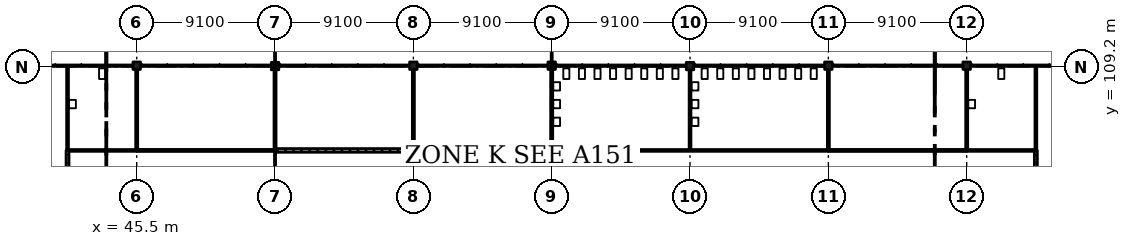
"""IFC4 building model, lengths in metres.
Left out: names, types, materials, properties, quantities, classifications, styles, units other than length and angle.
Written with IfcOpenShell. Run it as: python <this file> out.ifc"""

import sys

from ifc_helpers import new_model, si_unit, direction, frame, frame_2d, origin, origin_2d, place, context, subcontext, project, spatial, rectangle, extrude, element, fill, save


model = new_model("IFC4")
c1 = context("Model", 3, precision=1e-05, world=origin(), true_north=direction((0.0, 1.0)))
c2 = subcontext(c1, "Body", "Model", "MODEL_VIEW")
j1 = project(units=[si_unit("LENGTHUNIT", "METRE"), si_unit("PLANEANGLEUNIT", "RADIAN")], contexts=[c1])
p1 = place(None, origin())
s1 = spatial("IfcSite", under=j1, at=p1, CompositionType="ELEMENT")
p2 = place(p1, origin())
s2 = spatial("IfcBuilding", under=s1, at=p2, CompositionType="ELEMENT")
p3 = place(p2, frame((0.0, 0.0, 15.47)))
s3 = spatial("IfcBuildingStorey", under=s2, at=p3, CompositionType="ELEMENT", Elevation=15.47)
for number, where, z_axis, x_axis in (
    (1, (45.5, 109.275, 0.0), (0.0, 0.0, 1.0), (1.0, 0.0, 0.0)),
    (2, (54.6, 109.25, 0.0), (0.0, 0.0, 1.0), (1.0, 0.0, 0.0)),
    (3, (63.7, 109.275, 0.0), (0.0, 0.0, 1.0), (1.0, 0.0, 0.0)),
    (4, (72.8, 109.275, 0.0), (0.0, 0.0, 1.0), (1.0, 0.0, 0.0)),
    (5, (81.9, 109.25, 0.0), (0.0, 0.0, 1.0), (1.0, 0.0, 0.0)),
    (6, (91.0, 109.275, 0.0), (0.0, 0.0, 1.0), (1.0, 0.0, 0.0)),
    (7, (100.1, 109.275, 0.0), (0.0, 0.0, 1.0), (1.0, 0.0, 0.0)),
):
    element("IfcColumn", number, at=place(p3, frame(where, z_axis=z_axis, x_axis=x_axis)), inside=s3, PredefinedType="COLUMN", context=c2, shape_type="SweptSolid", body=[
        extrude(rectangle(XDim=0.5, YDim=0.5, at=origin_2d()), origin(), (0.0, 0.0, 1.0), 4.55),
    ])
p4 = place(p3, frame((40.95, 103.7, 0.0), z_axis=(0.0, 0.0, 1.0), x_axis=(0.0, -1.0, 0.0)))
e8 = element("IfcWall", 8, at=p4, inside=s3, PredefinedType="PARTITIONING", context=c2, shape_type="SweptSolid", body=[
    extrude(rectangle(XDim=3.6, YDim=0.2, at=frame_2d((1.8, 0.0))), origin(), (0.0, 0.0, 1.0), 3.7),
])
p5 = place(p4, frame((0.65, 0.0, 0.0)))
e9 = element("IfcOpeningElement", 9, at=p5, cuts=e8, PredefinedType="OPENING", context=c2, shape_type="SweptSolid", body=[
    extrude(rectangle(XDim=2.4, YDim=2.4, at=frame_2d((1.2, 1.2))), frame((0.0, 0.11, 0.0), z_axis=(0.0, -1.0, 0.0), x_axis=(1.0, 0.0, 0.0)), (0.0, 0.0, 1.0), 0.22),
])
p6 = place(p3, frame((40.95, 103.7, 0.0), z_axis=(0.0, 0.0, 1.0), x_axis=(0.0, 1.0, 0.0)))
e10 = element("IfcWall", 10, at=p6, inside=s3, PredefinedType="PARTITIONING", context=c2, shape_type="SweptSolid", body=[
    extrude(rectangle(XDim=5.47, YDim=0.125, at=frame_2d((2.735, 0.0))), origin(), (0.0, 0.0, 1.0), 3.7),
])
p7 = place(p3, frame((41.05, 103.7, 0.0), z_axis=(0.0, 0.0, 1.0), x_axis=(1.0, 0.0, 0.0)))
e11 = element("IfcWall", 11, at=p7, inside=s3, PredefinedType="PARTITIONING", context=c2, shape_type="SweptSolid", body=[
    extrude(rectangle(XDim=4.45, YDim=0.125, at=frame_2d((2.225, 0.0))), origin(), (0.0, 0.0, 1.0), 4.3),
])
p8 = place(p7, frame((1.75, 0.0, 0.0)))
e12 = element("IfcOpeningElement", 12, at=p8, cuts=e11, PredefinedType="OPENING", context=c2, shape_type="SweptSolid", body=[
    extrude(rectangle(XDim=1.0, YDim=2.1, at=frame_2d((0.5, 1.05))), frame((0.0, 0.073, 0.0), z_axis=(0.0, -1.0, 0.0), x_axis=(1.0, 0.0, 0.0)), (0.0, 0.0, 1.0), 0.145),
])
p9 = place(p3, frame((45.5, 103.7, 0.0), z_axis=(0.0, 0.0, 1.0), x_axis=(1.0, 0.0, 0.0)))
e13 = element("IfcWall", 13, at=p9, inside=s3, PredefinedType="SOLIDWALL", context=c2, shape_type="SweptSolid", body=[
    extrude(rectangle(XDim=9.1, YDim=0.14, at=frame_2d((4.55, 0.0))), origin(), (0.0, 0.0, 1.0), 4.3),
])
p10 = place(p9, frame((3.75, 0.0, 0.0)))
e14 = element("IfcOpeningElement", 14, at=p10, cuts=e13, PredefinedType="OPENING", context=c2, shape_type="SweptSolid", body=[
    extrude(rectangle(XDim=1.5, YDim=2.1, at=frame_2d((0.75, 1.05))), frame((0.0, 0.08, 0.0), z_axis=(0.0, -1.0, 0.0), x_axis=(1.0, 0.0, 0.0)), (0.0, 0.0, 1.0), 0.16),
])
p11 = place(p3, frame((45.5, 109.025, 0.0), z_axis=(0.0, 0.0, 1.0), x_axis=(0.0, -1.0, 0.0)))
e15 = element("IfcWall", 15, at=p11, inside=s3, PredefinedType="SOLIDWALL", context=c2, shape_type="SweptSolid", body=[
    extrude(rectangle(XDim=5.255, YDim=0.14, at=frame_2d((2.627, 0.0))), origin(), (0.0, 0.0, 1.0), 3.6),
])
p12 = place(p3, frame((54.6, 103.7, 0.0), z_axis=(0.0, 0.0, 1.0), x_axis=(1.0, 0.0, 0.0)))
e16 = element("IfcWall", 16, at=p12, inside=s3, PredefinedType="SOLIDWALL", context=c2, shape_type="SweptSolid", body=[
    extrude(rectangle(XDim=9.1, YDim=0.25, at=frame_2d((4.55, 0.0))), origin(), (0.0, 0.0, 1.0), 4.3),
])
p13 = place(p12, frame((4.05, 0.0, 0.0)))
e17 = element("IfcOpeningElement", 17, at=p13, cuts=e16, PredefinedType="OPENING", context=c2, shape_type="SweptSolid", body=[
    extrude(rectangle(XDim=1.0, YDim=2.1, at=frame_2d((0.5, 1.05))), frame((0.0, 0.135, 0.0), z_axis=(0.0, -1.0, 0.0), x_axis=(1.0, 0.0, 0.0)), (0.0, 0.0, 1.0), 0.27),
])
p14 = place(p3, frame((54.6, 109.0, 0.0), z_axis=(0.0, 0.0, 1.0), x_axis=(0.0, -1.0, 0.0)))
e18 = element("IfcWall", 18, at=p14, inside=s3, PredefinedType="SOLIDWALL", context=c2, shape_type="SweptSolid", body=[
    extrude(rectangle(XDim=5.175, YDim=0.14, at=frame_2d((2.587, 0.0))), origin(), (0.0, 0.0, 1.0), 3.6),
])
p15 = place(p3, frame((63.7, 103.7, 0.0), z_axis=(0.0, 0.0, 1.0), x_axis=(1.0, 0.0, 0.0)))
e19 = element("IfcWall", 19, at=p15, inside=s3, PredefinedType="SOLIDWALL", context=c2, shape_type="SweptSolid", body=[
    extrude(rectangle(XDim=9.1, YDim=0.14, at=frame_2d((4.55, 0.0))), origin(), (0.0, 0.0, 1.0), 4.3),
])
p16 = place(p15, frame((3.75, 0.0, 0.0)))
e20 = element("IfcOpeningElement", 20, at=p16, cuts=e19, PredefinedType="OPENING", context=c2, shape_type="SweptSolid", body=[
    extrude(rectangle(XDim=1.5, YDim=2.1, at=frame_2d((0.75, 1.05))), frame((0.0, 0.08, 0.0), z_axis=(0.0, -1.0, 0.0), x_axis=(1.0, 0.0, 0.0)), (0.0, 0.0, 1.0), 0.16),
])
p17 = place(p3, frame((63.7, 109.025, 0.0), z_axis=(0.0, 0.0, 1.0), x_axis=(0.0, -1.0, 0.0)))
e21 = element("IfcWall", 21, at=p17, inside=s3, PredefinedType="SOLIDWALL", context=c2, shape_type="SweptSolid", body=[
    extrude(rectangle(XDim=5.2, YDim=0.14, at=frame_2d((2.6, 0.0))), origin(), (0.0, 0.0, 1.0), 3.6),
])
p18 = place(p3, frame((72.8, 103.7, 0.0), z_axis=(0.0, 0.0, 1.0), x_axis=(1.0, 0.0, 0.0)))
e22 = element("IfcWall", 22, at=p18, inside=s3, PredefinedType="PARTITIONING", context=c2, shape_type="SweptSolid", body=[
    extrude(rectangle(XDim=18.2, YDim=0.125, at=frame_2d((9.1, 0.0))), origin(), (0.0, 0.0, 1.0), 4.3),
])
p19 = place(p18, frame((4.15, 0.0, 0.0)))
e23 = element("IfcOpeningElement", 23, at=p19, cuts=e22, PredefinedType="OPENING", context=c2, shape_type="SweptSolid", body=[
    extrude(rectangle(XDim=0.9, YDim=2.1, at=frame_2d((0.45, 1.05))), frame((0.0, 0.073, 0.0), z_axis=(0.0, -1.0, 0.0), x_axis=(1.0, 0.0, 0.0)), (0.0, 0.0, 1.0), 0.145),
])
p20 = place(p18, frame((13.15, 0.0, 0.0)))
e24 = element("IfcOpeningElement", 24, at=p20, cuts=e22, PredefinedType="OPENING", context=c2, shape_type="SweptSolid", body=[
    extrude(rectangle(XDim=0.9, YDim=2.1, at=frame_2d((0.45, 1.05))), frame((0.0, 0.073, 0.0), z_axis=(0.0, -1.0, 0.0), x_axis=(1.0, 0.0, 0.0)), (0.0, 0.0, 1.0), 0.145),
])
p21 = place(p3, frame((72.8, 109.025, 0.0), z_axis=(0.0, 0.0, 1.0), x_axis=(0.0, -1.0, 0.0)))
e25 = element("IfcWall", 25, at=p21, inside=s3, PredefinedType="SOLIDWALL", context=c2, shape_type="SweptSolid", body=[
    extrude(rectangle(XDim=5.255, YDim=0.14, at=frame_2d((2.627, 0.0))), origin(), (0.0, 0.0, 1.0), 3.6),
])
p22 = place(p3, frame((81.9, 109.0, 0.0), z_axis=(0.0, 0.0, 1.0), x_axis=(0.0, -1.0, 0.0)))
e26 = element("IfcWall", 26, at=p22, inside=s3, PredefinedType="PARTITIONING", context=c2, shape_type="SweptSolid", body=[
    extrude(rectangle(XDim=5.238, YDim=0.125, at=frame_2d((2.619, 0.0))), origin(), (0.0, 0.0, 1.0), 3.6),
])
p23 = place(p3, frame((91.0, 103.7, 0.0), z_axis=(0.0, 0.0, 1.0), x_axis=(1.0, 0.0, 0.0)))
e27 = element("IfcWall", 27, at=p23, inside=s3, PredefinedType="SOLIDWALL", context=c2, shape_type="SweptSolid", body=[
    extrude(rectangle(XDim=9.1, YDim=0.14, at=frame_2d((4.55, 0.0))), origin(), (0.0, 0.0, 1.0), 4.3),
])
p24 = place(p23, frame((3.75, 0.0, 0.0)))
e28 = element("IfcOpeningElement", 28, at=p24, cuts=e27, PredefinedType="OPENING", context=c2, shape_type="SweptSolid", body=[
    extrude(rectangle(XDim=1.5, YDim=2.1, at=frame_2d((0.75, 1.05))), frame((0.0, 0.08, 0.0), z_axis=(0.0, -1.0, 0.0), x_axis=(1.0, 0.0, 0.0)), (0.0, 0.0, 1.0), 0.16),
])
p25 = place(p3, frame((91.0, 109.025, 0.0), z_axis=(0.0, 0.0, 1.0), x_axis=(0.0, -1.0, 0.0)))
e29 = element("IfcWall", 29, at=p25, inside=s3, PredefinedType="SOLIDWALL", context=c2, shape_type="SweptSolid", body=[
    extrude(rectangle(XDim=5.255, YDim=0.14, at=frame_2d((2.627, 0.0))), origin(), (0.0, 0.0, 1.0), 3.6),
])
p26 = place(p3, frame((100.1, 103.7, 0.0), z_axis=(0.0, 0.0, 1.0), x_axis=(1.0, 0.0, 0.0)))
e30 = element("IfcWall", 30, at=p26, inside=s3, PredefinedType="PARTITIONING", context=c2, shape_type="SweptSolid", body=[
    extrude(rectangle(XDim=4.45, YDim=0.125, at=frame_2d((2.225, 0.0))), origin(), (0.0, 0.0, 1.0), 4.3),
])
p27 = place(p26, frame((1.75, 0.0, 0.0)))
e31 = element("IfcOpeningElement", 31, at=p27, cuts=e30, PredefinedType="OPENING", context=c2, shape_type="SweptSolid", body=[
    extrude(rectangle(XDim=1.0, YDim=2.1, at=frame_2d((0.5, 1.05))), frame((0.0, 0.073, 0.0), z_axis=(0.0, -1.0, 0.0), x_axis=(1.0, 0.0, 0.0)), (0.0, 0.0, 1.0), 0.145),
])
p28 = place(p3, frame((100.1, 109.025, 0.0), z_axis=(0.0, 0.0, 1.0), x_axis=(0.0, -1.0, 0.0)))
e32 = element("IfcWall", 32, at=p28, inside=s3, PredefinedType="SOLIDWALL", context=c2, shape_type="SweptSolid", body=[
    extrude(rectangle(XDim=5.255, YDim=0.14, at=frame_2d((2.627, 0.0))), origin(), (0.0, 0.0, 1.0), 3.6),
])
p29 = place(p3, frame((104.65, 100.1, 0.0), z_axis=(0.0, 0.0, 1.0), x_axis=(0.0, 1.0, 0.0)))
e33 = element("IfcWall", 33, at=p29, inside=s3, PredefinedType="PARTITIONING", context=c2, shape_type="SweptSolid", body=[
    extrude(rectangle(XDim=3.6, YDim=0.2, at=frame_2d((1.8, 0.0))), origin(), (0.0, 0.0, 1.0), 3.7),
])
p30 = place(p29, frame((0.65, 0.0, 0.0)))
e34 = element("IfcOpeningElement", 34, at=p30, cuts=e33, PredefinedType="OPENING", context=c2, shape_type="SweptSolid", body=[
    extrude(rectangle(XDim=2.4, YDim=2.4, at=frame_2d((1.2, 1.2))), frame((0.0, 0.11, 0.0), z_axis=(0.0, -1.0, 0.0), x_axis=(1.0, 0.0, 0.0)), (0.0, 0.0, 1.0), 0.22),
])
p31 = place(p3, frame((104.65, 103.7, 0.0), z_axis=(0.0, 0.0, 1.0), x_axis=(0.0, 1.0, 0.0)))
e35 = element("IfcWall", 35, at=p31, inside=s3, PredefinedType="PARTITIONING", context=c2, shape_type="SweptSolid", body=[
    extrude(rectangle(XDim=5.47, YDim=0.125, at=frame_2d((2.735, 0.0))), origin(), (0.0, 0.0, 1.0), 3.7),
])
p32 = place(p8, origin())
e36 = element("IfcDoor", 36, at=p32, inside=s3, OperationType="SINGLE_SWING_LEFT", PredefinedType="DOOR", context=c2, shape_type="SweptSolid", body=[
    extrude(rectangle(XDim=1.0, YDim=2.1, at=frame_2d((0.5, 1.05))), frame((0.0, 0.025, 0.0), z_axis=(0.0, -1.0, 0.0), x_axis=(1.0, 0.0, 0.0)), (0.0, 0.0, 1.0), 0.05),
])
fill(e12, e36)
p33 = place(p10, origin())
e37 = element("IfcDoor", 37, at=p33, inside=s3, OperationType="DOUBLE_DOOR_SINGLE_SWING", PredefinedType="DOOR", context=c2, shape_type="SweptSolid", body=[
    extrude(rectangle(XDim=1.5, YDim=2.1, at=frame_2d((0.75, 1.05))), frame((0.0, 0.025, 0.0), z_axis=(0.0, -1.0, 0.0), x_axis=(1.0, 0.0, 0.0)), (0.0, 0.0, 1.0), 0.05),
])
fill(e14, e37)
p34 = place(p13, origin())
e38 = element("IfcDoor", 38, at=p34, inside=s3, OperationType="SINGLE_SWING_RIGHT", PredefinedType="DOOR", context=c2, shape_type="SweptSolid", body=[
    extrude(rectangle(XDim=1.0, YDim=2.1, at=frame_2d((0.5, 1.05))), frame((0.0, 0.025, 0.0), z_axis=(0.0, -1.0, 0.0), x_axis=(1.0, 0.0, 0.0)), (0.0, 0.0, 1.0), 0.05),
])
fill(e17, e38)
p35 = place(p16, origin())
e39 = element("IfcDoor", 39, at=p35, inside=s3, OperationType="DOUBLE_DOOR_SINGLE_SWING", PredefinedType="DOOR", context=c2, shape_type="SweptSolid", body=[
    extrude(rectangle(XDim=1.5, YDim=2.1, at=frame_2d((0.75, 1.05))), frame((0.0, 0.025, 0.0), z_axis=(0.0, -1.0, 0.0), x_axis=(1.0, 0.0, 0.0)), (0.0, 0.0, 1.0), 0.05),
])
fill(e20, e39)
p36 = place(p19, origin())
e40 = element("IfcDoor", 40, at=p36, inside=s3, OperationType="SINGLE_SWING_LEFT", PredefinedType="DOOR", context=c2, shape_type="SweptSolid", body=[
    extrude(rectangle(XDim=0.9, YDim=2.1, at=frame_2d((0.45, 1.05))), frame((0.0, 0.025, 0.0), z_axis=(0.0, -1.0, 0.0), x_axis=(1.0, 0.0, 0.0)), (0.0, 0.0, 1.0), 0.05),
])
fill(e23, e40)
p37 = place(p20, origin())
e41 = element("IfcDoor", 41, at=p37, inside=s3, OperationType="SINGLE_SWING_RIGHT", PredefinedType="DOOR", context=c2, shape_type="SweptSolid", body=[
    extrude(rectangle(XDim=0.9, YDim=2.1, at=frame_2d((0.45, 1.05))), frame((0.0, 0.025, 0.0), z_axis=(0.0, -1.0, 0.0), x_axis=(1.0, 0.0, 0.0)), (0.0, 0.0, 1.0), 0.05),
])
fill(e24, e41)
p38 = place(p24, origin())
e42 = element("IfcDoor", 42, at=p38, inside=s3, OperationType="DOUBLE_DOOR_SINGLE_SWING", PredefinedType="DOOR", context=c2, shape_type="SweptSolid", body=[
    extrude(rectangle(XDim=1.5, YDim=2.1, at=frame_2d((0.75, 1.05))), frame((0.0, 0.025, 0.0), z_axis=(0.0, -1.0, 0.0), x_axis=(1.0, 0.0, 0.0)), (0.0, 0.0, 1.0), 0.05),
])
fill(e28, e42)
p39 = place(p27, origin())
e43 = element("IfcDoor", 43, at=p39, inside=s3, OperationType="SINGLE_SWING_LEFT", PredefinedType="DOOR", context=c2, shape_type="SweptSolid", body=[
    extrude(rectangle(XDim=1.0, YDim=2.1, at=frame_2d((0.5, 1.05))), frame((0.0, 0.025, 0.0), z_axis=(0.0, -1.0, 0.0), x_axis=(1.0, 0.0, 0.0)), (0.0, 0.0, 1.0), 0.05),
])
fill(e31, e43)
p40 = place(p30, origin())
e44 = element("IfcDoor", 44, at=p40, inside=s3, OperationType="DOUBLE_DOOR_SINGLE_SWING", PredefinedType="DOOR", context=c2, shape_type="SweptSolid", body=[
    extrude(rectangle(XDim=2.4, YDim=2.4, at=frame_2d((1.2, 1.2))), frame((0.0, 0.025, 0.0), z_axis=(0.0, -1.0, 0.0), x_axis=(1.0, 0.0, 0.0)), (0.0, 0.0, 1.0), 0.05),
])
fill(e34, e44)
p41 = place(p5, origin())
e45 = element("IfcDoor", 45, at=p41, inside=s3, OperationType="DOUBLE_DOOR_SINGLE_SWING", PredefinedType="DOOR", context=c2, shape_type="SweptSolid", body=[
    extrude(rectangle(XDim=2.4, YDim=2.4, at=frame_2d((1.2, 1.2))), frame((0.0, 0.025, 0.0), z_axis=(0.0, -1.0, 0.0), x_axis=(1.0, 0.0, 0.0)), (0.0, 0.0, 1.0), 0.05),
])
fill(e9, e45)
save(model, sys.argv[1])
